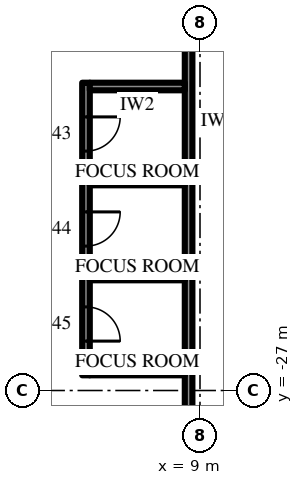
"""IFC4 building model, lengths in metres.
Left out: names, types, materials, properties, quantities, classifications, styles, units other than length and angle.
Written with IfcOpenShell. Run it as: python <this file> out.ifc"""

import sys

from ifc_helpers import new_model, si_unit, direction, frame, frame_2d, origin, place, context, subcontext, project, spatial, rectangle, extrude, element, fill, save


model = new_model("IFC4")
c1 = context("Model", 3, precision=1e-05, world=origin(), true_north=direction((0.0, 1.0)))
c2 = subcontext(c1, "Body", "Model", "MODEL_VIEW")
j1 = project(units=[si_unit("LENGTHUNIT", "METRE"), si_unit("PLANEANGLEUNIT", "RADIAN")], contexts=[c1])
p1 = place(None, origin())
s1 = spatial("IfcSite", under=j1, at=p1, CompositionType="ELEMENT")
p2 = place(p1, origin())
s2 = spatial("IfcBuilding", under=s1, at=p2, CompositionType="ELEMENT")
p3 = place(p2, frame((0.0, 0.0, 136.3)))
s3 = spatial("IfcBuildingStorey", under=s2, at=p3, CompositionType="ELEMENT", Elevation=136.3)
p4 = place(p3, frame((8.7, -12.3, 0.0), z_axis=(0.0, 0.0, 1.0), x_axis=(0.0, -1.0, 0.0)))
e1 = element("IfcWall", 1, at=p4, inside=s3, PredefinedType="PARTITIONING", context=c2, shape_type="SweptSolid", body=[
    extrude(rectangle(XDim=19.0, YDim=0.2, at=frame_2d((9.5, 0.0))), origin(), (0.0, 0.0, 1.0), 4.0),
])
p5 = place(p4, frame((1.4, 0.0, 0.0)))
e2 = element("IfcOpeningElement", 2, at=p5, cuts=e1, PredefinedType="OPENING", context=c2, shape_type="SweptSolid", body=[
    extrude(rectangle(XDim=1.0, YDim=2.2, at=frame_2d((0.5, 1.1))), frame((0.0, 0.11, 0.0), z_axis=(0.0, -1.0, 0.0), x_axis=(1.0, 0.0, 0.0)), (0.0, 0.0, 1.0), 0.22),
])
p6 = place(p3, frame((6.0, -18.9, 0.0), z_axis=(0.0, 0.0, 1.0), x_axis=(0.0, -1.0, 0.0)))
e3 = element("IfcWall", 3, at=p6, inside=s3, PredefinedType="PARTITIONING", context=c2, shape_type="SweptSolid", body=[
    extrude(rectangle(XDim=7.7, YDim=0.2, at=frame_2d((3.85, 0.0))), origin(), (0.0, 0.0, 1.0), 4.0),
])
p7 = place(p6, frame((0.9, 0.0, 0.0)))
e4 = element("IfcOpeningElement", 4, at=p7, cuts=e3, PredefinedType="OPENING", context=c2, shape_type="SweptSolid", body=[
    extrude(rectangle(XDim=0.9, YDim=2.2, at=frame_2d((0.45, 1.1))), frame((0.0, 0.11, 0.0), z_axis=(0.0, -1.0, 0.0), x_axis=(1.0, 0.0, 0.0)), (0.0, 0.0, 1.0), 0.22),
])
p8 = place(p6, frame((3.4, 0.0, 0.0)))
e5 = element("IfcOpeningElement", 5, at=p8, cuts=e3, PredefinedType="OPENING", context=c2, shape_type="SweptSolid", body=[
    extrude(rectangle(XDim=0.9, YDim=2.2, at=frame_2d((0.45, 1.1))), frame((0.0, 0.11, 0.0), z_axis=(0.0, -1.0, 0.0), x_axis=(1.0, 0.0, 0.0)), (0.0, 0.0, 1.0), 0.22),
])
p9 = place(p6, frame((5.9, 0.0, 0.0)))
e6 = element("IfcOpeningElement", 6, at=p9, cuts=e3, PredefinedType="OPENING", context=c2, shape_type="SweptSolid", body=[
    extrude(rectangle(XDim=0.9, YDim=2.2, at=frame_2d((0.45, 1.1))), frame((0.0, 0.11, 0.0), z_axis=(0.0, -1.0, 0.0), x_axis=(1.0, 0.0, 0.0)), (0.0, 0.0, 1.0), 0.22),
])
for number, where, z_axis, x_axis in (
    (7, (8.6, -19.0, 0.0), (0.0, 0.0, 1.0), (-1.0, 0.0, 0.0)),
    (8, (8.6, -21.5, 0.0), (0.0, 0.0, 1.0), (-1.0, 0.0, 0.0)),
    (9, (8.6, -24.0, 0.0), (0.0, 0.0, 1.0), (-1.0, 0.0, 0.0)),
    (10, (8.6, -26.5, 0.0), (0.0, 0.0, 1.0), (-1.0, 0.0, 0.0)),
):
    element("IfcWall", number, at=place(p3, frame(where, z_axis=z_axis, x_axis=x_axis)), inside=s3, PredefinedType="PARTITIONING", context=c2, shape_type="SweptSolid", body=[
        extrude(rectangle(XDim=2.5, YDim=0.2, at=frame_2d((1.25, 0.0))), origin(), (0.0, 0.0, 1.0), 4.0),
    ])
p10 = place(p7, origin())
e11 = element("IfcDoor", 11, at=p10, inside=s3, OperationType="SINGLE_SWING_RIGHT", PredefinedType="DOOR", context=c2, shape_type="SweptSolid", body=[
    extrude(rectangle(XDim=0.9, YDim=2.2, at=frame_2d((0.45, 1.1))), frame((0.0, 0.025, 0.0), z_axis=(0.0, -1.0, 0.0), x_axis=(1.0, 0.0, 0.0)), (0.0, 0.0, 1.0), 0.05),
])
fill(e4, e11)
p11 = place(p8, origin())
e12 = element("IfcDoor", 12, at=p11, inside=s3, OperationType="SINGLE_SWING_RIGHT", PredefinedType="DOOR", context=c2, shape_type="SweptSolid", body=[
    extrude(rectangle(XDim=0.9, YDim=2.2, at=frame_2d((0.45, 1.1))), frame((0.0, 0.025, 0.0), z_axis=(0.0, -1.0, 0.0), x_axis=(1.0, 0.0, 0.0)), (0.0, 0.0, 1.0), 0.05),
])
fill(e5, e12)
p12 = place(p9, origin())
e13 = element("IfcDoor", 13, at=p12, inside=s3, OperationType="SINGLE_SWING_LEFT", PredefinedType="DOOR", context=c2, shape_type="SweptSolid", body=[
    extrude(rectangle(XDim=0.9, YDim=2.2, at=frame_2d((0.45, 1.1))), frame((0.0, 0.025, 0.0), z_axis=(0.0, -1.0, 0.0), x_axis=(1.0, 0.0, 0.0)), (0.0, 0.0, 1.0), 0.05),
])
fill(e6, e13)
save(model, sys.argv[1])
